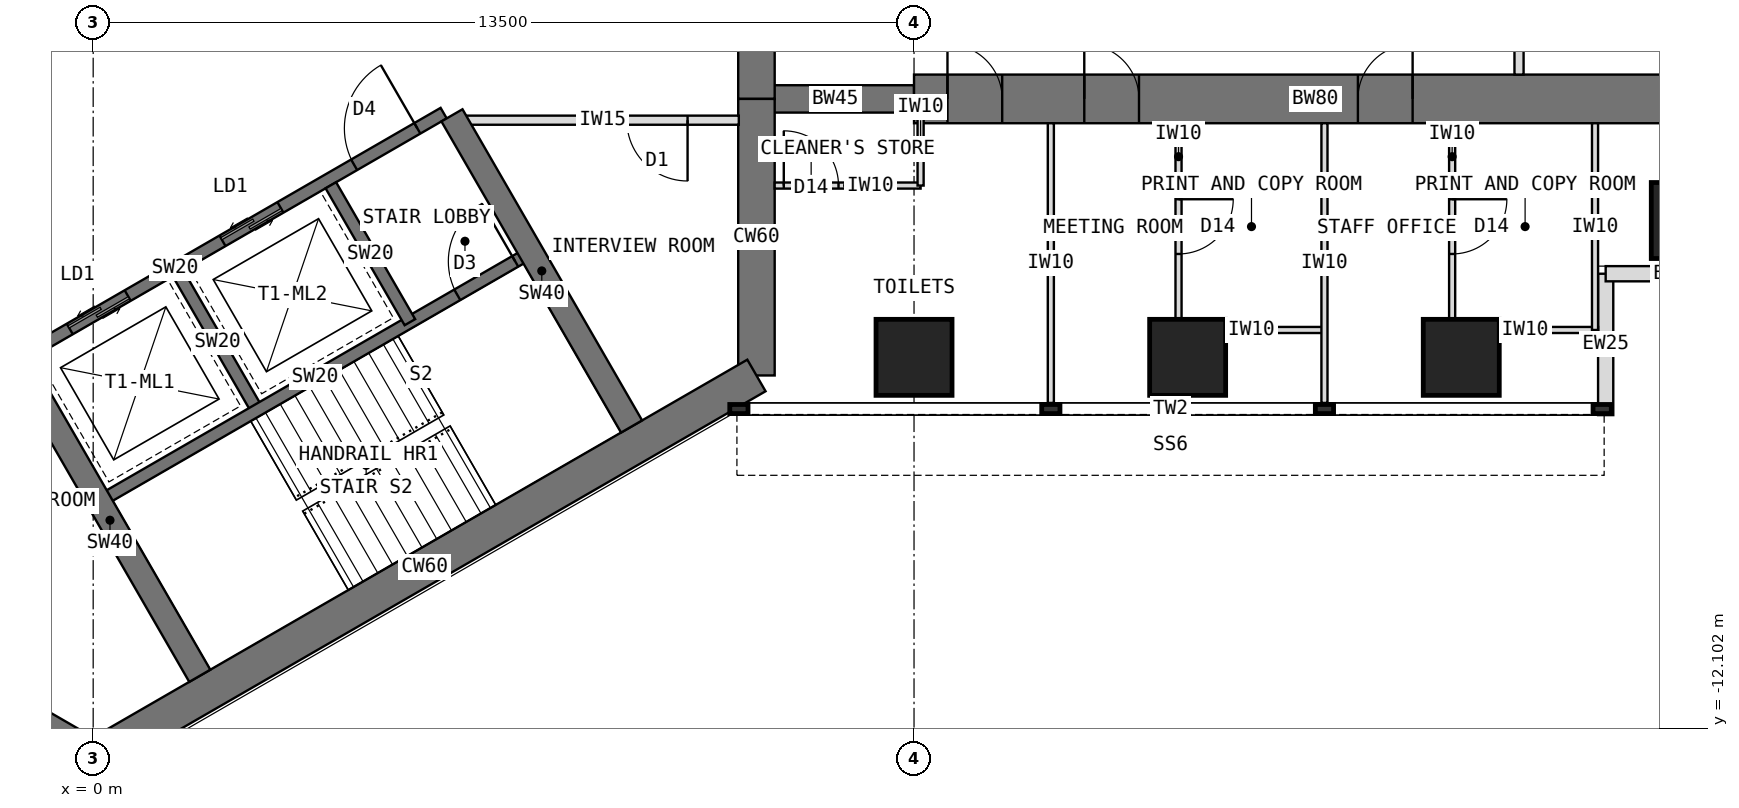
"""IFC4 building model, lengths in metres.
Left out: names, types, materials, properties, quantities, classifications, styles, units other than length and angle.
Written with IfcOpenShell. Run it as: python <this file> out.ifc"""

import sys

from ifc_helpers import new_model, si_unit, direction, frame, frame_2d, origin, origin_2d, place, context, subcontext, project, spatial, rectangle, extrude, element, fill, save


model = new_model("IFC4")
c1 = context("Model", 3, precision=1e-05, world=origin(), true_north=direction((0.0, 1.0)))
c2 = subcontext(c1, "Body", "Model", "MODEL_VIEW")
j1 = project(units=[si_unit("LENGTHUNIT", "METRE"), si_unit("PLANEANGLEUNIT", "RADIAN")], contexts=[c1])
p1 = place(None, origin())
s1 = spatial("IfcSite", under=j1, at=p1, CompositionType="ELEMENT")
p2 = place(p1, origin())
s2 = spatial("IfcBuilding", under=s1, at=p2, CompositionType="ELEMENT")
p3 = place(p2, frame((0.0, 0.0, 161.5)))
s3 = spatial("IfcBuildingStorey", under=s2, at=p3, CompositionType="ELEMENT", Elevation=161.5)
p4 = place(p3, frame((10.908, -6.298, 0.0), z_axis=(0.0, 0.0, 1.0), x_axis=(0.0, 1.0, 0.0)))
e1 = element("IfcWall", 1, at=p4, inside=s3, PredefinedType="SHEAR", context=c2, shape_type="SweptSolid", body=[
    extrude(rectangle(XDim=4.548, YDim=0.6, at=frame_2d((2.274, 0.0))), origin(), (0.0, 0.0, 1.0), 4.0),
])
p5 = place(p3, frame((10.908, -1.75, 0.0), z_axis=(0.0, 0.0, 1.0), x_axis=(0.0, 1.0, 0.0)))
e2 = element("IfcWall", 2, at=p5, inside=s3, PredefinedType="SHEAR", context=c2, shape_type="SweptSolid", body=[
    extrude(rectangle(XDim=3.5, YDim=0.6, at=frame_2d((1.75, 0.0))), origin(), (0.0, 0.0, 1.0), 4.0),
])
p6 = place(p5, frame((0.85, 0.0, 0.0)))
e3 = element("IfcOpeningElement", 3, at=p6, cuts=e2, PredefinedType="OPENING", context=c2, shape_type="SweptSolid", body=[
    extrude(rectangle(XDim=1.8, YDim=2.1, at=frame_2d((0.9, 1.05))), frame((0.0, 0.31, 0.0), z_axis=(0.0, -1.0, 0.0), x_axis=(1.0, 0.0, 0.0)), (0.0, 0.0, 1.0), 0.62),
])
p7 = place(p3, frame((-3.939, -10.322, 0.0), z_axis=(0.0, 0.0, 1.0), x_axis=(0.866011268655, -0.500024481964, 0.0)))
e4 = element("IfcWall", 4, at=p7, inside=s3, PredefinedType="SHEAR", context=c2, shape_type="SweptSolid", body=[
    extrude(rectangle(XDim=4.548, YDim=0.6, at=frame_2d((2.274, 0.0))), origin(), (0.0, 0.0, 1.0), 4.0),
])
p8 = place(p3, frame((0.0, -12.596, 0.0), z_axis=(0.0, 0.0, 1.0), x_axis=(0.866021940709, 0.500005998175, 0.0)))
e5 = element("IfcWall", 5, at=p8, inside=s3, PredefinedType="SHEAR", context=c2, shape_type="SweptSolid", body=[
    extrude(rectangle(XDim=12.596, YDim=0.6, at=frame_2d((6.298, 0.0))), origin(), (0.0, 0.0, 1.0), 4.0),
])
p9 = place(p3, frame((10.908, -1.75, 0.0), z_axis=(0.0, 0.0, 1.0), x_axis=(1.0, 0.0, 0.0)))
e6 = element("IfcWall", 6, at=p9, inside=s3, PredefinedType="SHEAR", context=c2, shape_type="SweptSolid", body=[
    extrude(rectangle(XDim=2.592, YDim=0.45, at=frame_2d((1.296, 0.0))), origin(), (0.0, 0.0, 1.0), 4.0),
])
p10 = place(p3, frame((13.5, -1.75, 0.0), z_axis=(0.0, 0.0, 1.0), x_axis=(1.0, 0.0, 0.0)))
e7 = element("IfcWall", 7, at=p10, inside=s3, PredefinedType="SHEAR", context=c2, shape_type="SweptSolid", body=[
    extrude(rectangle(XDim=13.2, YDim=0.8, at=frame_2d((6.6, 0.0))), origin(), (0.0, 0.0, 1.0), 4.0),
])
p11 = place(p10, frame((0.55, 0.0, 0.0)))
e8 = element("IfcOpeningElement", 8, at=p11, cuts=e7, PredefinedType="OPENING", context=c2, shape_type="SweptSolid", body=[
    extrude(rectangle(XDim=0.9, YDim=2.1, at=frame_2d((0.45, 1.05))), frame((0.0, 0.41, 0.0), z_axis=(0.0, -1.0, 0.0), x_axis=(1.0, 0.0, 0.0)), (0.0, 0.0, 1.0), 0.82),
])
p12 = place(p10, frame((2.8, 0.0, 0.0)))
e9 = element("IfcOpeningElement", 9, at=p12, cuts=e7, PredefinedType="OPENING", context=c2, shape_type="SweptSolid", body=[
    extrude(rectangle(XDim=0.9, YDim=2.1, at=frame_2d((0.45, 1.05))), frame((0.0, 0.41, 0.0), z_axis=(0.0, -1.0, 0.0), x_axis=(1.0, 0.0, 0.0)), (0.0, 0.0, 1.0), 0.82),
])
p13 = place(p10, frame((7.3, 0.0, 0.0)))
e10 = element("IfcOpeningElement", 10, at=p13, cuts=e7, PredefinedType="OPENING", context=c2, shape_type="SweptSolid", body=[
    extrude(rectangle(XDim=0.9, YDim=2.1, at=frame_2d((0.45, 1.05))), frame((0.0, 0.41, 0.0), z_axis=(0.0, -1.0, 0.0), x_axis=(1.0, 0.0, 0.0)), (0.0, 0.0, 1.0), 0.82),
])
for number, where, z_axis, x_axis in (
    (11, (13.5, -6.0, 0.0), (0.0, 0.0, 1.0), (1.0, 0.0, 0.0)),
    (12, (18.0, -6.0, 0.0), (0.0, 0.0, 1.0), (1.0, 0.0, 0.0)),
    (13, (22.5, -6.0, 0.0), (0.0, 0.0, 1.0), (1.0, 0.0, 0.0)),
    (14, (26.25, -3.75, 0.0), (0.0, 0.0, 1.0), (1.0, 0.0, 0.0)),
):
    element("IfcColumn", number, at=place(p3, frame(where, z_axis=z_axis, x_axis=x_axis)), inside=s3, PredefinedType="COLUMN", context=c2, shape_type="SweptSolid", body=[
        extrude(rectangle(XDim=1.25, YDim=1.25, at=origin_2d()), origin(), (0.0, 0.0, 1.0), 4.0),
    ])
for number, where, z_axis, x_axis in (
    (15, (24.875, -6.95, 0.0), (0.0, 0.0, 1.0), (0.0, 1.0, 0.0)),
    (16, (24.875, -4.625, 0.0), (0.0, 0.0, 1.0), (1.0, 0.0, 0.0)),
):
    element("IfcWall", number, at=place(p3, frame(where, z_axis=z_axis, x_axis=x_axis)), inside=s3, PredefinedType="STANDARD", context=c2, shape_type="SweptSolid", body=[
        extrude(rectangle(XDim=2.325, YDim=0.25, at=frame_2d((1.163, 0.0))), origin(), (0.0, 0.0, 1.0), 3.7),
    ])
p14 = place(p3, frame((-1.164, -5.984, 0.0), z_axis=(0.0, 0.0, 1.0), x_axis=(0.866026010844, 0.49999894854, 0.0)))
e17 = element("IfcWall", 17, at=p14, inside=s3, PredefinedType="SHEAR", context=c2, shape_type="SweptSolid", body=[
    extrude(rectangle(XDim=8.0, YDim=0.2, at=frame_2d((4.0, 0.0))), origin(), (0.0, 0.0, 1.0), 4.0),
])
p15 = place(p14, frame((6.3, 0.0, 0.0)))
e18 = element("IfcOpeningElement", 18, at=p15, cuts=e17, PredefinedType="OPENING", context=c2, shape_type="SweptSolid", body=[
    extrude(rectangle(XDim=1.2, YDim=2.1, at=frame_2d((0.6, 1.05))), frame((0.0, 0.11, 0.0), z_axis=(0.0, -1.0, 0.0), x_axis=(1.0, 0.0, 0.0)), (0.0, 0.0, 1.0), 0.22),
])
p16 = place(p14, frame((0.9, 0.0, 0.0)))
e19 = element("IfcOpeningElement", 19, at=p16, cuts=e17, PredefinedType="OPENING", context=c2, shape_type="SweptSolid", body=[
    extrude(rectangle(XDim=1.1, YDim=2.2, at=frame_2d((0.55, 1.1))), frame((0.0, 0.11, 0.0), z_axis=(0.0, -1.0, 0.0), x_axis=(1.0, 0.0, 0.0)), (0.0, 0.0, 1.0), 0.22),
])
p17 = place(p14, frame((3.8, 0.0, 0.0)))
e20 = element("IfcOpeningElement", 20, at=p17, cuts=e17, PredefinedType="OPENING", context=c2, shape_type="SweptSolid", body=[
    extrude(rectangle(XDim=1.1, YDim=2.2, at=frame_2d((0.55, 1.1))), frame((0.0, 0.11, 0.0), z_axis=(0.0, -1.0, 0.0), x_axis=(1.0, 0.0, 0.0)), (0.0, 0.0, 1.0), 0.22),
])
p18 = place(p3, frame((1.397, -4.62, 0.0), z_axis=(0.0, 0.0, 1.0), x_axis=(0.499936506574, -0.866062058628, 0.0)))
e21 = element("IfcWall", 21, at=p18, inside=s3, PredefinedType="SHEAR", context=c2, shape_type="SweptSolid", body=[
    extrude(rectangle(XDim=2.6, YDim=0.2, at=frame_2d((1.3, 0.0))), origin(), (0.0, 0.0, 1.0), 4.0),
])
p19 = place(p3, frame((3.909, -3.17, 0.0), z_axis=(0.0, 0.0, 1.0), x_axis=(0.49997716683, -0.86603858612, 0.0)))
e22 = element("IfcWall", 22, at=p19, inside=s3, PredefinedType="SHEAR", context=c2, shape_type="SweptSolid", body=[
    extrude(rectangle(XDim=2.6, YDim=0.2, at=frame_2d((1.3, 0.0))), origin(), (0.0, 0.0, 1.0), 4.0),
])
p20 = place(p3, frame((0.186, -8.322, 0.0), z_axis=(0.0, 0.0, 1.0), x_axis=(0.866026010844, 0.49999894854, 0.0)))
e23 = element("IfcWall", 23, at=p20, inside=s3, PredefinedType="SHEAR", context=c2, shape_type="SweptSolid", body=[
    extrude(rectangle(XDim=8.0, YDim=0.2, at=frame_2d((4.0, 0.0))), origin(), (0.0, 0.0, 1.0), 4.0),
])
p21 = place(p20, frame((6.7, 0.0, 0.0)))
e24 = element("IfcOpeningElement", 24, at=p21, cuts=e23, PredefinedType="OPENING", context=c2, shape_type="SweptSolid", body=[
    extrude(rectangle(XDim=1.1, YDim=2.1, at=frame_2d((0.55, 1.05))), frame((0.0, 0.11, 0.0), z_axis=(0.0, -1.0, 0.0), x_axis=(1.0, 0.0, 0.0)), (0.0, 0.0, 1.0), 0.22),
])
p22 = place(p3, frame((5.901, -2.02, 0.0), z_axis=(0.0, 0.0, 1.0), x_axis=(0.500027676417, -0.866009424208, 0.0)))
e25 = element("IfcWall", 25, at=p22, inside=s3, PredefinedType="SHEAR", context=c2, shape_type="SweptSolid", body=[
    extrude(rectangle(XDim=5.908, YDim=0.4, at=frame_2d((2.954, 0.0))), origin(), (0.0, 0.0, 1.0), 4.0),
])
p23 = place(p3, frame((-1.201, -6.12, 0.0), z_axis=(0.0, 0.0, 1.0), x_axis=(0.49999668571, -0.866027317282, 0.0)))
e26 = element("IfcWall", 26, at=p23, inside=s3, PredefinedType="SHEAR", context=c2, shape_type="SweptSolid", body=[
    extrude(rectangle(XDim=5.908, YDim=0.4, at=frame_2d((2.954, 0.0))), origin(), (0.0, 0.0, 1.0), 4.0),
])
for number, where, z_axis, x_axis in (
    (27, (15.75, -2.15, 0.0), (0.0, 0.0, 1.0), (0.0, -1.0, 0.0)),
    (28, (20.25, -2.15, 0.0), (0.0, 0.0, 1.0), (0.0, -1.0, 0.0)),
):
    element("IfcWall", number, at=place(p3, frame(where, z_axis=z_axis, x_axis=x_axis)), inside=s3, PredefinedType="PARTITIONING", context=c2, shape_type="SweptSolid", body=[
        extrude(rectangle(XDim=4.6, YDim=0.1, at=frame_2d((2.3, 0.0))), origin(), (0.0, 0.0, 1.0), 3.7),
    ])
p24 = place(p3, frame((17.85, -5.55, 0.0), z_axis=(0.0, 0.0, 1.0), x_axis=(1.0, 0.0, 0.0)))
e29 = element("IfcWall", 29, at=p24, inside=s3, PredefinedType="PARTITIONING", context=c2, shape_type="SweptSolid", body=[
    extrude(rectangle(XDim=2.4, YDim=0.1, at=frame_2d((1.2, 0.0))), origin(), (0.0, 0.0, 1.0), 3.7),
])
p25 = place(p3, frame((17.85, -2.15, 0.0), z_axis=(0.0, 0.0, 1.0), x_axis=(0.0, -1.0, 0.0)))
e30 = element("IfcWall", 30, at=p25, inside=s3, PredefinedType="PARTITIONING", context=c2, shape_type="SweptSolid", body=[
    extrude(rectangle(XDim=3.4, YDim=0.1, at=frame_2d((1.7, 0.0))), origin(), (0.0, 0.0, 1.0), 3.7),
])
p26 = place(p25, frame((1.25, 0.0, 0.0)))
e31 = element("IfcOpeningElement", 31, at=p26, cuts=e30, PredefinedType="OPENING", context=c2, shape_type="SweptSolid", body=[
    extrude(rectangle(XDim=0.9, YDim=2.1, at=frame_2d((0.45, 1.05))), frame((0.0, 0.06, 0.0), z_axis=(0.0, -1.0, 0.0), x_axis=(1.0, 0.0, 0.0)), (0.0, 0.0, 1.0), 0.12),
])
p27 = place(p3, frame((22.35, -5.55, 0.0), z_axis=(0.0, 0.0, 1.0), x_axis=(1.0, 0.0, 0.0)))
e32 = element("IfcWall", 32, at=p27, inside=s3, PredefinedType="PARTITIONING", context=c2, shape_type="SweptSolid", body=[
    extrude(rectangle(XDim=2.4, YDim=0.1, at=frame_2d((1.2, 0.0))), origin(), (0.0, 0.0, 1.0), 3.7),
])
p28 = place(p3, frame((22.35, -2.15, 0.0), z_axis=(0.0, 0.0, 1.0), x_axis=(0.0, -1.0, 0.0)))
e33 = element("IfcWall", 33, at=p28, inside=s3, PredefinedType="PARTITIONING", context=c2, shape_type="SweptSolid", body=[
    extrude(rectangle(XDim=3.4, YDim=0.1, at=frame_2d((1.7, 0.0))), origin(), (0.0, 0.0, 1.0), 3.7),
])
p29 = place(p28, frame((1.25, 0.0, 0.0)))
e34 = element("IfcOpeningElement", 34, at=p29, cuts=e33, PredefinedType="OPENING", context=c2, shape_type="SweptSolid", body=[
    extrude(rectangle(XDim=0.9, YDim=2.1, at=frame_2d((0.45, 1.05))), frame((0.0, 0.06, 0.0), z_axis=(0.0, -1.0, 0.0), x_axis=(1.0, 0.0, 0.0)), (0.0, 0.0, 1.0), 0.12),
])
p30 = place(p3, frame((24.7, -2.15, 0.0), z_axis=(0.0, 0.0, 1.0), x_axis=(0.0, -1.0, 0.0)))
e35 = element("IfcWall", 35, at=p30, inside=s3, PredefinedType="PARTITIONING", context=c2, shape_type="SweptSolid", body=[
    extrude(rectangle(XDim=3.4, YDim=0.1, at=frame_2d((1.7, 0.0))), origin(), (0.0, 0.0, 1.0), 3.7),
])
p31 = place(p3, frame((11.208, -3.175, 0.0), z_axis=(0.0, 0.0, 1.0), x_axis=(1.0, 0.0, 0.0)))
e36 = element("IfcWall", 36, at=p31, inside=s3, PredefinedType="PARTITIONING", context=c2, shape_type="SweptSolid", body=[
    extrude(rectangle(XDim=2.4, YDim=0.1, at=frame_2d((1.2, 0.0))), origin(), (0.0, 0.0, 1.0), 3.7),
])
p32 = place(p31, frame((0.15, 0.0, 0.0)))
e37 = element("IfcOpeningElement", 37, at=p32, cuts=e36, PredefinedType="OPENING", context=c2, shape_type="SweptSolid", body=[
    extrude(rectangle(XDim=0.9, YDim=2.1, at=frame_2d((0.45, 1.05))), frame((0.0, 0.06, 0.0), z_axis=(0.0, -1.0, 0.0), x_axis=(1.0, 0.0, 0.0)), (0.0, 0.0, 1.0), 0.12),
])
p33 = place(p3, frame((13.608, -1.975, 0.0), z_axis=(0.0, 0.0, 1.0), x_axis=(0.0, -1.0, 0.0)))
e38 = element("IfcWall", 38, at=p33, inside=s3, PredefinedType="PARTITIONING", context=c2, shape_type="SweptSolid", body=[
    extrude(rectangle(XDim=1.2, YDim=0.1, at=frame_2d((0.6, 0.0))), origin(), (0.0, 0.0, 1.0), 3.7),
])
p34 = place(p3, frame((10.618, -2.1, 0.0), z_axis=(0.0, 0.0, 1.0), x_axis=(-1.0, 0.0, 0.0)))
e39 = element("IfcWall", 39, at=p34, inside=s3, PredefinedType="PARTITIONING", context=c2, shape_type="SweptSolid", body=[
    extrude(rectangle(XDim=4.476, YDim=0.15, at=frame_2d((2.238, 0.0))), origin(), (0.0, 0.0, 1.0), 3.7),
])
p35 = place(p34, frame((0.843, 0.0, 0.0)))
e40 = element("IfcOpeningElement", 40, at=p35, cuts=e39, PredefinedType="OPENING", context=c2, shape_type="SweptSolid", body=[
    extrude(rectangle(XDim=1.0, YDim=2.1, at=frame_2d((0.5, 1.05))), frame((0.0, 0.085, 0.0), z_axis=(0.0, -1.0, 0.0), x_axis=(1.0, 0.0, 0.0)), (0.0, 0.0, 1.0), 0.17),
])
p36 = place(p3, frame((23.45, -1.35, 0.0), z_axis=(0.0, 0.0, 1.0), x_axis=(0.0, 1.0, 0.0)))
e41 = element("IfcWall", 41, at=p36, inside=s3, PredefinedType="PARTITIONING", context=c2, shape_type="SweptSolid", body=[
    extrude(rectangle(XDim=2.7, YDim=0.15, at=frame_2d((1.35, 0.0))), origin(), (0.0, 0.0, 1.0), 3.7),
])
p37 = place(p36, frame((0.85, 0.0, 0.0)))
e42 = element("IfcOpeningElement", 42, at=p37, cuts=e41, PredefinedType="OPENING", context=c2, shape_type="SweptSolid", body=[
    extrude(rectangle(XDim=1.0, YDim=2.1, at=frame_2d((0.5, 1.05))), frame((0.0, 0.085, 0.0), z_axis=(0.0, -1.0, 0.0), x_axis=(1.0, 0.0, 0.0)), (0.0, 0.0, 1.0), 0.17),
])
p38 = place(p15, origin())
e43 = element("IfcDoor", 43, at=p38, inside=s3, OperationType="SINGLE_SWING_RIGHT", PredefinedType="DOOR", context=c2, shape_type="SweptSolid", body=[
    extrude(rectangle(XDim=1.2, YDim=2.1, at=frame_2d((0.6, 1.05))), frame((0.0, 0.025, 0.0), z_axis=(0.0, -1.0, 0.0), x_axis=(1.0, 0.0, 0.0)), (0.0, 0.0, 1.0), 0.05),
])
fill(e18, e43)
p39 = place(p16, origin())
e44 = element("IfcDoor", 44, at=p39, inside=s3, OperationType="DOUBLE_DOOR_SLIDING", PredefinedType="DOOR", context=c2, shape_type="SweptSolid", body=[
    extrude(rectangle(XDim=1.1, YDim=2.2, at=frame_2d((0.55, 1.1))), frame((0.0, 0.025, 0.0), z_axis=(0.0, -1.0, 0.0), x_axis=(1.0, 0.0, 0.0)), (0.0, 0.0, 1.0), 0.05),
])
fill(e19, e44)
p40 = place(p17, origin())
e45 = element("IfcDoor", 45, at=p40, inside=s3, OperationType="DOUBLE_DOOR_SLIDING", PredefinedType="DOOR", context=c2, shape_type="SweptSolid", body=[
    extrude(rectangle(XDim=1.1, YDim=2.2, at=frame_2d((0.55, 1.1))), frame((0.0, 0.025, 0.0), z_axis=(0.0, -1.0, 0.0), x_axis=(1.0, 0.0, 0.0)), (0.0, 0.0, 1.0), 0.05),
])
fill(e20, e45)
p41 = place(p21, origin())
e46 = element("IfcDoor", 46, at=p41, inside=s3, OperationType="SINGLE_SWING_RIGHT", PredefinedType="DOOR", context=c2, shape_type="SweptSolid", body=[
    extrude(rectangle(XDim=1.1, YDim=2.1, at=frame_2d((0.55, 1.05))), frame((0.0, 0.025, 0.0), z_axis=(0.0, -1.0, 0.0), x_axis=(1.0, 0.0, 0.0)), (0.0, 0.0, 1.0), 0.05),
])
fill(e24, e46)
p42 = place(p26, origin())
e47 = element("IfcDoor", 47, at=p42, inside=s3, OperationType="SINGLE_SWING_LEFT", PredefinedType="DOOR", context=c2, shape_type="SweptSolid", body=[
    extrude(rectangle(XDim=0.9, YDim=2.1, at=frame_2d((0.45, 1.05))), frame((0.0, 0.025, 0.0), z_axis=(0.0, -1.0, 0.0), x_axis=(1.0, 0.0, 0.0)), (0.0, 0.0, 1.0), 0.05),
])
fill(e31, e47)
p43 = place(p29, origin())
e48 = element("IfcDoor", 48, at=p43, inside=s3, OperationType="SINGLE_SWING_LEFT", PredefinedType="DOOR", context=c2, shape_type="SweptSolid", body=[
    extrude(rectangle(XDim=0.9, YDim=2.1, at=frame_2d((0.45, 1.05))), frame((0.0, 0.025, 0.0), z_axis=(0.0, -1.0, 0.0), x_axis=(1.0, 0.0, 0.0)), (0.0, 0.0, 1.0), 0.05),
])
fill(e34, e48)
p44 = place(p32, origin())
e49 = element("IfcDoor", 49, at=p44, inside=s3, OperationType="SINGLE_SWING_LEFT", PredefinedType="DOOR", context=c2, shape_type="SweptSolid", body=[
    extrude(rectangle(XDim=0.9, YDim=2.1, at=frame_2d((0.45, 1.05))), frame((0.0, 0.025, 0.0), z_axis=(0.0, -1.0, 0.0), x_axis=(1.0, 0.0, 0.0)), (0.0, 0.0, 1.0), 0.05),
])
fill(e37, e49)
p45 = place(p35, origin())
e50 = element("IfcDoor", 50, at=p45, inside=s3, OperationType="SINGLE_SWING_LEFT", PredefinedType="DOOR", context=c2, shape_type="SweptSolid", body=[
    extrude(rectangle(XDim=1.0, YDim=2.1, at=frame_2d((0.5, 1.05))), frame((0.0, 0.025, 0.0), z_axis=(0.0, -1.0, 0.0), x_axis=(1.0, 0.0, 0.0)), (0.0, 0.0, 1.0), 0.05),
])
fill(e40, e50)
p46 = place(p11, origin())
e51 = element("IfcDoor", 51, at=p46, inside=s3, OperationType="SINGLE_SWING_LEFT", PredefinedType="DOOR", context=c2, shape_type="SweptSolid", body=[
    extrude(rectangle(XDim=0.82, YDim=2.06, at=frame_2d((0.45, 1.03))), frame((0.0, 0.025, 0.0), z_axis=(0.0, -1.0, 0.0), x_axis=(1.0, 0.0, 0.0)), (0.0, 0.0, 1.0), 0.05),
    extrude(rectangle(XDim=0.04, YDim=2.1, at=frame_2d((0.02, 1.05))), frame((0.0, 0.4, 0.0), z_axis=(0.0, -1.0, 0.0), x_axis=(1.0, 0.0, 0.0)), (0.0, 0.0, 1.0), 0.8),
    extrude(rectangle(XDim=0.04, YDim=2.1, at=frame_2d((0.88, 1.05))), frame((0.0, 0.4, 0.0), z_axis=(0.0, -1.0, 0.0), x_axis=(1.0, 0.0, 0.0)), (0.0, 0.0, 1.0), 0.8),
    extrude(rectangle(XDim=0.82, YDim=0.04, at=frame_2d((0.45, 2.08))), frame((0.0, 0.4, 0.0), z_axis=(0.0, -1.0, 0.0), x_axis=(1.0, 0.0, 0.0)), (0.0, 0.0, 1.0), 0.8),
])
fill(e8, e51)
p47 = place(p12, origin())
e52 = element("IfcDoor", 52, at=p47, inside=s3, OperationType="SINGLE_SWING_LEFT", PredefinedType="DOOR", context=c2, shape_type="SweptSolid", body=[
    extrude(rectangle(XDim=0.82, YDim=2.06, at=frame_2d((0.45, 1.03))), frame((0.0, 0.025, 0.0), z_axis=(0.0, -1.0, 0.0), x_axis=(1.0, 0.0, 0.0)), (0.0, 0.0, 1.0), 0.05),
    extrude(rectangle(XDim=0.04, YDim=2.1, at=frame_2d((0.02, 1.05))), frame((0.0, 0.4, 0.0), z_axis=(0.0, -1.0, 0.0), x_axis=(1.0, 0.0, 0.0)), (0.0, 0.0, 1.0), 0.8),
    extrude(rectangle(XDim=0.04, YDim=2.1, at=frame_2d((0.88, 1.05))), frame((0.0, 0.4, 0.0), z_axis=(0.0, -1.0, 0.0), x_axis=(1.0, 0.0, 0.0)), (0.0, 0.0, 1.0), 0.8),
    extrude(rectangle(XDim=0.82, YDim=0.04, at=frame_2d((0.45, 2.08))), frame((0.0, 0.4, 0.0), z_axis=(0.0, -1.0, 0.0), x_axis=(1.0, 0.0, 0.0)), (0.0, 0.0, 1.0), 0.8),
])
fill(e9, e52)
p48 = place(p13, origin())
e53 = element("IfcDoor", 53, at=p48, inside=s3, OperationType="SINGLE_SWING_RIGHT", PredefinedType="DOOR", context=c2, shape_type="SweptSolid", body=[
    extrude(rectangle(XDim=0.82, YDim=2.06, at=frame_2d((0.45, 1.03))), frame((0.0, 0.025, 0.0), z_axis=(0.0, -1.0, 0.0), x_axis=(1.0, 0.0, 0.0)), (0.0, 0.0, 1.0), 0.05),
    extrude(rectangle(XDim=0.04, YDim=2.1, at=frame_2d((0.02, 1.05))), frame((0.0, 0.4, 0.0), z_axis=(0.0, -1.0, 0.0), x_axis=(1.0, 0.0, 0.0)), (0.0, 0.0, 1.0), 0.8),
    extrude(rectangle(XDim=0.04, YDim=2.1, at=frame_2d((0.88, 1.05))), frame((0.0, 0.4, 0.0), z_axis=(0.0, -1.0, 0.0), x_axis=(1.0, 0.0, 0.0)), (0.0, 0.0, 1.0), 0.8),
    extrude(rectangle(XDim=0.82, YDim=0.04, at=frame_2d((0.45, 2.08))), frame((0.0, 0.4, 0.0), z_axis=(0.0, -1.0, 0.0), x_axis=(1.0, 0.0, 0.0)), (0.0, 0.0, 1.0), 0.8),
])
fill(e10, e53)
save(model, sys.argv[1])
